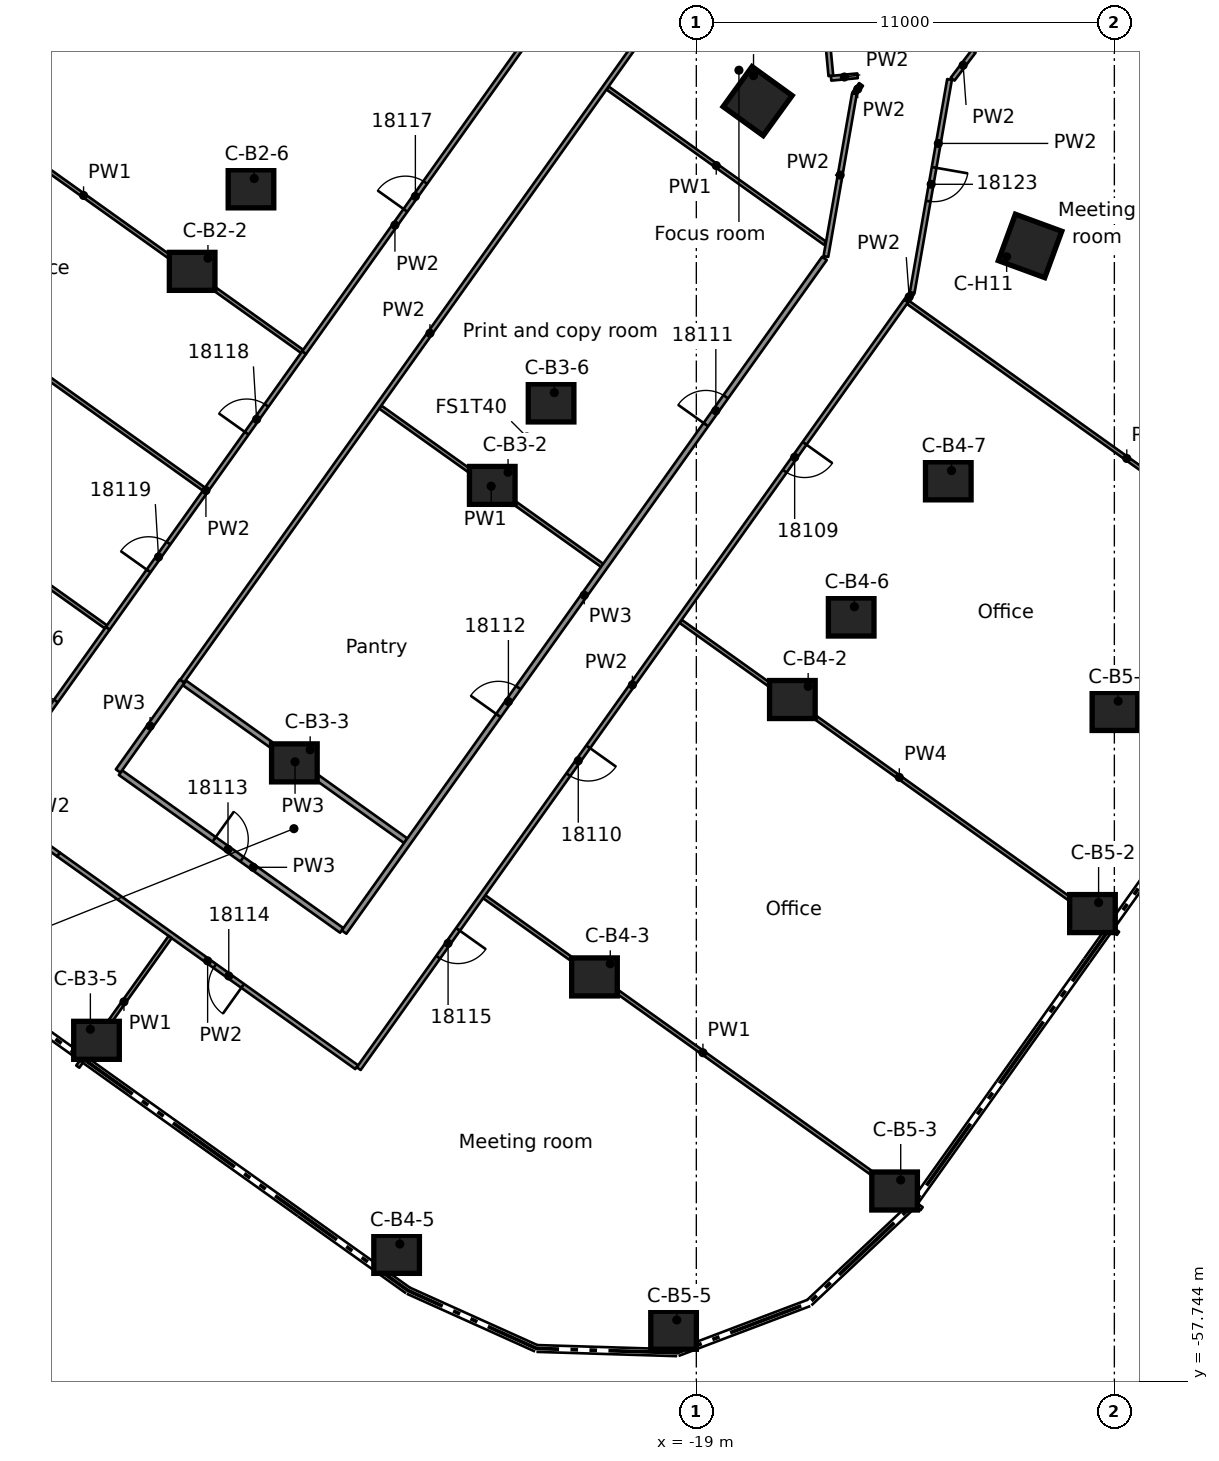
"""IFC4 building model, lengths in metres.
Left out: names, types, materials, properties, quantities, classifications, styles, units other than length and angle.
Written with IfcOpenShell. Run it as: python <this file> out.ifc"""

import sys

from ifc_helpers import new_model, si_unit, direction, frame, frame_2d, origin, origin_2d, place, context, subcontext, project, spatial, rectangle, extrude, element, fill, save


model = new_model("IFC4")
c1 = context("Model", 3, precision=1e-05, world=origin(), true_north=direction((0.0, 1.0)))
c2 = subcontext(c1, "Body", "Model", "MODEL_VIEW")
j1 = project(units=[si_unit("LENGTHUNIT", "METRE"), si_unit("PLANEANGLEUNIT", "RADIAN")], contexts=[c1])
p1 = place(None, origin())
s1 = spatial("IfcSite", under=j1, at=p1, CompositionType="ELEMENT")
p2 = place(p1, origin())
s2 = spatial("IfcBuilding", under=s1, at=p2, CompositionType="ELEMENT")
p3 = place(p2, frame((0.0, 0.0, 91.2)))
s3 = spatial("IfcBuildingStorey", under=s2, at=p3, CompositionType="ELEMENT", Elevation=91.2)
for number, where, z_axis, x_axis in (
    (1, (-32.267, -28.533, 0.0), (0.0, 0.0, 1.0), (1.0, 0.0, 0.0)),
    (2, (-30.719, -26.362, 0.0), (0.0, 0.0, 1.0), (1.0, 0.0, 0.0)),
    (3, (-24.37, -34.166, 0.0), (0.0, 0.0, 1.0), (1.0, 0.0, 0.0)),
    (4, (-29.577, -41.466, 0.0), (0.0, 0.0, 1.0), (1.0, 0.0, 0.0)),
    (5, (-34.784, -48.766, 0.0), (0.0, 0.0, 1.0), (1.0, 0.0, 0.0)),
    (6, (-22.822, -31.995, 0.0), (0.0, 0.0, 1.0), (1.0, 0.0, 0.0)),
    (7, (-16.473, -39.799, 0.0), (0.0, 0.0, 1.0), (1.0, 0.0, 0.0)),
    (8, (-21.68, -47.098, 0.0), (0.0, 0.0, 1.0), (1.0, 0.0, 0.0)),
    (9, (-26.887, -54.398, 0.0), (0.0, 0.0, 1.0), (1.0, 0.0, 0.0)),
    (10, (-14.925, -37.628, 0.0), (0.0, 0.0, 1.0), (1.0, 0.0, 0.0)),
    (11, (-12.37, -34.045, 0.0), (0.0, 0.0, 1.0), (1.0, 0.0, 0.0)),
    (12, (-8.576, -45.431, 0.0), (0.0, 0.0, 1.0), (1.0, 0.0, 0.0)),
    (13, (-13.783, -52.731, 0.0), (0.0, 0.0, 1.0), (1.0, 0.0, 0.0)),
    (14, (-19.599, -56.395, 0.0), (0.0, 0.0, 1.0), (1.0, 0.0, 0.0)),
    (15, (-7.985, -40.113, 0.0), (0.0, 0.0, 1.0), (1.0, 0.0, 0.0)),
):
    element("IfcColumn", number, at=place(p3, frame(where, z_axis=z_axis, x_axis=x_axis)), inside=s3, PredefinedType="COLUMN", context=c2, shape_type="SweptSolid", body=[
        extrude(rectangle(XDim=1.2, YDim=1.0, at=origin_2d()), origin(), (0.0, 0.0, 1.0), 3.5),
    ])
for number, where, z_axis, x_axis in (
    (16, (-10.218, -27.864, 0.0), (0.0, 0.0, 1.0), (-0.344, -0.939, 0.0)),
    (17, (-17.387, -24.053, 0.0), (0.0, 0.0, 1.0), (-0.586, -0.81, 0.0)),
):
    element("IfcColumn", number, at=place(p3, frame(where, z_axis=z_axis, x_axis=x_axis)), inside=s3, PredefinedType="COLUMN", context=c2, shape_type="SweptSolid", body=[
        extrude(rectangle(XDim=1.3, YDim=1.3, at=origin_2d()), origin(), (0.0, 0.0, 1.0), 3.5),
    ])
p4 = place(p3, frame((-16.234, -15.113, 0.0), z_axis=(0.0, 0.0, 1.0), x_axis=(0.093098705764, -0.995656884165, 0.0)))
e18 = element("IfcWall", 18, at=p4, inside=s3, PredefinedType="PARTITIONING", context=c2, shape_type="SweptSolid", body=[
    extrude(rectangle(XDim=8.313, YDim=0.125, at=frame_2d((4.156, 0.0))), origin(), (0.0, 0.0, 1.0), 3.08),
])
p5 = place(p3, frame((-37.685, -42.521, 0.0), z_axis=(0.0, 0.0, 1.0), x_axis=(0.81441767076, -0.580279120385, 0.0)))
e19 = element("IfcWall", 19, at=p5, inside=s3, PredefinedType="PARTITIONING", context=c2, shape_type="SweptSolid", body=[
    extrude(rectangle(XDim=2.337, YDim=0.125, at=frame_2d((1.168, 0.0))), origin(), (0.0, 0.0, 1.0), 3.08),
])
p6 = place(p3, frame((-27.938, -49.473, 0.0), z_axis=(0.0, 0.0, 1.0), x_axis=(-0.814120225936, 0.580696355871, 0.0)))
e20 = element("IfcWall", 20, at=p6, inside=s3, PredefinedType="PARTITIONING", context=c2, shape_type="SweptSolid", body=[
    extrude(rectangle(XDim=9.635, YDim=0.125, at=frame_2d((4.817, 0.0))), origin(), (0.0, 0.0, 1.0), 3.08),
])
p7 = place(p6, frame((3.684, 0.0, 0.0)))
e21 = element("IfcOpeningElement", 21, at=p7, cuts=e20, PredefinedType="OPENING", context=c2, shape_type="SweptSolid", body=[
    extrude(rectangle(XDim=0.9, YDim=2.1, at=frame_2d((0.45, 1.05))), frame((0.0, 0.073, 0.0), z_axis=(0.0, -1.0, 0.0), x_axis=(1.0, 0.0, 0.0)), (0.0, 0.0, 1.0), 0.145),
])
p8 = place(p3, frame((-34.153, -41.723, 0.0), z_axis=(0.0, 0.0, 1.0), x_axis=(0.814226878362, -0.580546803069, 0.0)))
e22 = element("IfcWall", 22, at=p8, inside=s3, PredefinedType="PARTITIONING", context=c2, shape_type="SweptSolid", body=[
    extrude(rectangle(XDim=7.15, YDim=0.15, at=frame_2d((3.575, 0.0))), origin(), (0.0, 0.0, 1.0), 3.08),
])
p9 = place(p8, frame((3.025, 0.0, 0.0)))
e23 = element("IfcOpeningElement", 23, at=p9, cuts=e22, PredefinedType="OPENING", context=c2, shape_type="SweptSolid", body=[
    extrude(rectangle(XDim=0.9, YDim=2.1, at=frame_2d((0.45, 1.05))), frame((0.0, 0.085, 0.0), z_axis=(0.0, -1.0, 0.0), x_axis=(1.0, 0.0, 0.0)), (0.0, 0.0, 1.0), 0.17),
])
p10 = place(p3, frame((-46.044, -29.68, 0.0), z_axis=(0.0, 0.0, 1.0), x_axis=(0.814139435618, -0.580669423486, 0.0)))
e24 = element("IfcWall", 24, at=p10, inside=s3, PredefinedType="PARTITIONING", context=c2, shape_type="SweptSolid", body=[
    extrude(rectangle(XDim=14.134, YDim=0.1, at=frame_2d((7.067, 0.0))), origin(), (0.0, 0.0, 1.0), 3.08),
])
p11 = place(p3, frame((-32.471, -39.361, 0.0), z_axis=(0.0, 0.0, 1.0), x_axis=(0.814159942616, -0.580640670156, 0.0)))
e25 = element("IfcWall", 25, at=p11, inside=s3, PredefinedType="PARTITIONING", context=c2, shape_type="SweptSolid", body=[
    extrude(rectangle(XDim=7.152, YDim=0.15, at=frame_2d((3.576, 0.0))), origin(), (0.0, 0.0, 1.0), 3.08),
])
p12 = place(p3, frame((-24.581, -44.988, 0.0), z_axis=(0.0, 0.0, 1.0), x_axis=(0.814126528241, -0.580687520112, 0.0)))
e26 = element("IfcWall", 26, at=p12, inside=s3, PredefinedType="PARTITIONING", context=c2, shape_type="SweptSolid", body=[
    extrude(rectangle(XDim=14.137, YDim=0.1, at=frame_2d((7.068, 0.0))), origin(), (0.0, 0.0, 1.0), 3.08),
])
p13 = place(p3, frame((-43.46, -26.057, 0.0), z_axis=(0.0, 0.0, 1.0), x_axis=(0.814102199131, -0.580721628124, 0.0)))
e27 = element("IfcWall", 27, at=p13, inside=s3, PredefinedType="PARTITIONING", context=c2, shape_type="SweptSolid", body=[
    extrude(rectangle(XDim=14.131, YDim=0.1, at=frame_2d((7.065, 0.0))), origin(), (0.0, 0.0, 1.0), 3.08),
])
p14 = place(p3, frame((-40.875, -22.433, 0.0), z_axis=(0.0, 0.0, 1.0), x_axis=(0.814073113892, -0.580762399987, 0.0)))
e28 = element("IfcWall", 28, at=p14, inside=s3, PredefinedType="PARTITIONING", context=c2, shape_type="SweptSolid", body=[
    extrude(rectangle(XDim=14.128, YDim=0.1, at=frame_2d((7.064, 0.0))), origin(), (0.0, 0.0, 1.0), 3.08),
])
p15 = place(p3, frame((-27.317, -32.104, 0.0), z_axis=(0.0, 0.0, 1.0), x_axis=(0.814119765042, -0.580697002031, 0.0)))
e29 = element("IfcWall", 29, at=p15, inside=s3, PredefinedType="PARTITIONING", context=c2, shape_type="SweptSolid", body=[
    extrude(rectangle(XDim=7.171, YDim=0.1, at=frame_2d((3.585, 0.0))), origin(), (0.0, 0.0, 1.0), 3.08),
])
p16 = place(p3, frame((-19.413, -37.742, 0.0), z_axis=(0.0, 0.0, 1.0), x_axis=(0.81409387042, -0.580733303801, 0.0)))
e30 = element("IfcWall", 30, at=p16, inside=s3, PredefinedType="PARTITIONING", context=c2, shape_type="SweptSolid", body=[
    extrude(rectangle(XDim=14.137, YDim=0.1, at=frame_2d((7.069, 0.0))), origin(), (0.0, 0.0, 1.0), 2.445),
])
p17 = place(p3, frame((-21.337, -23.709, 0.0), z_axis=(0.0, 0.0, 1.0), x_axis=(0.814073636445, -0.580761667507, 0.0)))
e31 = element("IfcWall", 31, at=p17, inside=s3, PredefinedType="PARTITIONING", context=c2, shape_type="SweptSolid", body=[
    extrude(rectangle(XDim=7.029, YDim=0.1, at=frame_2d((3.514, 0.0))), origin(), (0.0, 0.0, 1.0), 3.08),
])
p18 = place(p3, frame((-13.427, -29.351, 0.0), z_axis=(0.0, 0.0, 1.0), x_axis=(0.814070572037, -0.580765962969, 0.0)))
e32 = element("IfcWall", 32, at=p18, inside=s3, PredefinedType="PARTITIONING", context=c2, shape_type="SweptSolid", body=[
    extrude(rectangle(XDim=14.136, YDim=0.1, at=frame_2d((7.068, 0.0))), origin(), (0.0, 0.0, 1.0), 3.08),
])
p19 = place(p3, frame((-12.256, -23.476, 0.0), z_axis=(0.0, 0.0, 1.0), x_axis=(0.603013454961, 0.797731015528, 0.0)))
e33 = element("IfcWall", 33, at=p19, inside=s3, PredefinedType="PARTITIONING", context=c2, shape_type="SweptSolid", body=[
    extrude(rectangle(XDim=0.919, YDim=0.125, at=frame_2d((0.459, 0.0))), origin(), (0.0, 0.0, 1.0), 3.08),
])
p20 = place(p3, frame((-15.454, -23.452, 0.0), z_axis=(0.0, 0.0, 1.0), x_axis=(0.995687741578, 0.09276810482, 0.0)))
e34 = element("IfcWall", 34, at=p20, inside=s3, PredefinedType="PARTITIONING", context=c2, shape_type="SweptSolid", body=[
    extrude(rectangle(XDim=0.7, YDim=0.125, at=frame_2d((0.35, 0.0))), origin(), (0.0, 0.0, 1.0), 3.08),
])
p21 = place(p3, frame((-14.84, -23.857, 0.0), z_axis=(0.0, 0.0, 1.0), x_axis=(0.586176879317, 0.810183106559, 0.0)))
e35 = element("IfcWall", 35, at=p21, inside=s3, PredefinedType="PARTITIONING", context=c2, shape_type="SweptSolid", body=[
    extrude(rectangle(XDim=0.299, YDim=0.125, at=frame_2d((0.149, 0.0))), origin(), (0.0, 0.0, 1.0), 3.08),
])
p22 = place(p3, frame((-13.478, -29.315, 0.0), z_axis=(0.0, 0.0, 1.0), x_axis=(0.581578261401, 0.813490458374, 0.0)))
e36 = element("IfcWall", 36, at=p22, inside=s3, PredefinedType="PARTITIONING", context=c2, shape_type="SweptSolid", body=[
    extrude(rectangle(XDim=0.271, YDim=0.125, at=frame_2d((0.136, 0.0))), origin(), (0.0, 0.0, 1.0), 3.08),
])
p23 = place(p3, frame((-13.48, -29.312, 0.0), z_axis=(0.0, 0.0, 1.0), x_axis=(-0.580603145907, -0.814186702767, 0.0)))
e37 = element("IfcWall", 37, at=p23, inside=s3, PredefinedType="PARTITIONING", context=c2, shape_type="SweptSolid", body=[
    extrude(rectangle(XDim=24.809, YDim=0.125, at=frame_2d((12.404, 0.0))), origin(), (0.0, 0.0, 1.0), 3.08),
])
p24 = place(p23, frame((4.601, 0.0, 0.0)))
e38 = element("IfcOpeningElement", 38, at=p24, cuts=e37, PredefinedType="OPENING", context=c2, shape_type="SweptSolid", body=[
    extrude(rectangle(XDim=0.9, YDim=2.1, at=frame_2d((0.45, 1.05))), frame((0.0, 0.073, 0.0), z_axis=(0.0, -1.0, 0.0), x_axis=(1.0, 0.0, 0.0)), (0.0, 0.0, 1.0), 0.145),
])
p25 = place(p23, frame((14.408, 0.0, 0.0)))
e39 = element("IfcOpeningElement", 39, at=p25, cuts=e37, PredefinedType="OPENING", context=c2, shape_type="SweptSolid", body=[
    extrude(rectangle(XDim=0.9, YDim=2.1, at=frame_2d((0.45, 1.05))), frame((0.0, 0.073, 0.0), z_axis=(0.0, -1.0, 0.0), x_axis=(1.0, 0.0, 0.0)), (0.0, 0.0, 1.0), 0.145),
])
p26 = place(p23, frame((20.309, 0.0, 0.0)))
e40 = element("IfcOpeningElement", 40, at=p26, cuts=e37, PredefinedType="OPENING", context=c2, shape_type="SweptSolid", body=[
    extrude(rectangle(XDim=0.9, YDim=2.1, at=frame_2d((0.45, 1.05))), frame((0.0, 0.073, 0.0), z_axis=(0.0, -1.0, 0.0), x_axis=(1.0, 0.0, 0.0)), (0.0, 0.0, 1.0), 0.145),
])
p27 = place(p3, frame((-28.27, -45.918, 0.0), z_axis=(0.0, 0.0, 1.0), x_axis=(0.580618548841, 0.81417571859, 0.0)))
e41 = element("IfcWall", 41, at=p27, inside=s3, PredefinedType="PARTITIONING", context=c2, shape_type="SweptSolid", body=[
    extrude(rectangle(XDim=21.772, YDim=0.15, at=frame_2d((10.886, 0.0))), origin(), (0.0, 0.0, 1.0), 3.08),
])
p28 = place(p27, frame((16.399, 0.0, 0.0)))
e42 = element("IfcOpeningElement", 42, at=p28, cuts=e41, PredefinedType="OPENING", context=c2, shape_type="SweptSolid", body=[
    extrude(rectangle(XDim=0.9, YDim=2.1, at=frame_2d((0.45, 1.05))), frame((0.0, 0.085, 0.0), z_axis=(0.0, -1.0, 0.0), x_axis=(1.0, 0.0, 0.0)), (0.0, 0.0, 1.0), 0.17),
])
p29 = place(p27, frame((6.999, 0.0, 0.0)))
e43 = element("IfcOpeningElement", 43, at=p29, cuts=e41, PredefinedType="OPENING", context=c2, shape_type="SweptSolid", body=[
    extrude(rectangle(XDim=0.9, YDim=2.1, at=frame_2d((0.45, 1.05))), frame((0.0, 0.085, 0.0), z_axis=(0.0, -1.0, 0.0), x_axis=(1.0, 0.0, 0.0)), (0.0, 0.0, 1.0), 0.17),
])
p30 = place(p3, frame((-35.277, -49.458, 0.0), z_axis=(0.0, 0.0, 1.0), x_axis=(0.580636826357, 0.814162683914, 0.0)))
e44 = element("IfcWall", 44, at=p30, inside=s3, PredefinedType="PARTITIONING", context=c2, shape_type="SweptSolid", body=[
    extrude(rectangle(XDim=4.187, YDim=0.1, at=frame_2d((2.094, 0.0))), origin(), (0.0, 0.0, 1.0), 3.08),
])
p31 = place(p3, frame((-32.532, -39.317, 0.0), z_axis=(0.0, 0.0, 1.0), x_axis=(0.58017556932, 0.814491441799, 0.0)))
e45 = element("IfcWall", 45, at=p31, inside=s3, PredefinedType="PARTITIONING", context=c2, shape_type="SweptSolid", body=[
    extrude(rectangle(XDim=22.483, YDim=0.125, at=frame_2d((11.241, 0.0))), origin(), (0.0, 0.0, 1.0), 3.08),
])
p32 = place(p3, frame((-34.214, -41.679, 0.0), z_axis=(0.0, 0.0, 1.0), x_axis=(0.580082812888, 0.814557505761, 0.0)))
e46 = element("IfcWall", 46, at=p32, inside=s3, PredefinedType="PARTITIONING", context=c2, shape_type="SweptSolid", body=[
    extrude(rectangle(XDim=2.9, YDim=0.15, at=frame_2d((1.45, 0.0))), origin(), (0.0, 0.0, 1.0), 3.08),
])
p33 = place(p3, frame((-37.736, -42.485, 0.0), z_axis=(0.0, 0.0, 1.0), x_axis=(0.580223472601, 0.814457317385, 0.0)))
e47 = element("IfcWall", 47, at=p33, inside=s3, PredefinedType="PARTITIONING", context=c2, shape_type="SweptSolid", body=[
    extrude(rectangle(XDim=5.601, YDim=0.125, at=frame_2d((2.801, 0.0))), origin(), (0.0, 0.0, 1.0), 3.08),
])
p34 = place(p33, frame((2.35, 0.0, 0.0)))
e48 = element("IfcOpeningElement", 48, at=p34, cuts=e47, PredefinedType="OPENING", context=c2, shape_type="SweptSolid", body=[
    extrude(rectangle(XDim=0.9, YDim=2.1, at=frame_2d((0.45, 1.05))), frame((0.0, 0.073, 0.0), z_axis=(0.0, -1.0, 0.0), x_axis=(1.0, 0.0, 0.0)), (0.0, 0.0, 1.0), 0.145),
])
p35 = place(p3, frame((-29.323, -30.674, 0.0), z_axis=(0.0, 0.0, 1.0), x_axis=(0.580180127153, 0.814488195161, 0.0)))
e49 = element("IfcWall", 49, at=p35, inside=s3, PredefinedType="PARTITIONING", context=c2, shape_type="SweptSolid", body=[
    extrude(rectangle(XDim=10.307, YDim=0.125, at=frame_2d((5.154, 0.0))), origin(), (0.0, 0.0, 1.0), 3.08),
])
p36 = place(p35, frame((4.6, 0.0, 0.0)))
e50 = element("IfcOpeningElement", 50, at=p36, cuts=e49, PredefinedType="OPENING", context=c2, shape_type="SweptSolid", body=[
    extrude(rectangle(XDim=0.9, YDim=2.1, at=frame_2d((0.45, 1.05))), frame((0.0, 0.073, 0.0), z_axis=(0.0, -1.0, 0.0), x_axis=(1.0, 0.0, 0.0)), (0.0, 0.0, 1.0), 0.145),
])
p37 = place(p3, frame((-34.486, -37.923, 0.0), z_axis=(0.0, 0.0, 1.0), x_axis=(0.580137406413, 0.814518624514, 0.0)))
e51 = element("IfcWall", 51, at=p37, inside=s3, PredefinedType="PARTITIONING", context=c2, shape_type="SweptSolid", body=[
    extrude(rectangle(XDim=8.9, YDim=0.125, at=frame_2d((4.45, 0.0))), origin(), (0.0, 0.0, 1.0), 3.08),
])
p38 = place(p37, frame((6.299, 0.0, 0.0)))
e52 = element("IfcOpeningElement", 52, at=p38, cuts=e51, PredefinedType="OPENING", context=c2, shape_type="SweptSolid", body=[
    extrude(rectangle(XDim=0.9, YDim=2.1, at=frame_2d((0.45, 1.05))), frame((0.0, 0.073, 0.0), z_axis=(0.0, -1.0, 0.0), x_axis=(1.0, 0.0, 0.0)), (0.0, 0.0, 1.0), 0.145),
])
p39 = place(p37, frame((1.85, 0.0, 0.0)))
e53 = element("IfcOpeningElement", 53, at=p39, cuts=e51, PredefinedType="OPENING", context=c2, shape_type="SweptSolid", body=[
    extrude(rectangle(XDim=0.9, YDim=2.1, at=frame_2d((0.45, 1.05))), frame((0.0, 0.073, 0.0), z_axis=(0.0, -1.0, 0.0), x_axis=(1.0, 0.0, 0.0)), (0.0, 0.0, 1.0), 0.145),
])
p40 = place(p3, frame((-12.337, -23.484, 0.0), z_axis=(0.0, 0.0, 1.0), x_axis=(-0.172645513087, -0.984984023632, 0.0)))
e54 = element("IfcWall", 54, at=p40, inside=s3, PredefinedType="PARTITIONING", context=c2, shape_type="SweptSolid", body=[
    extrude(rectangle(XDim=5.695, YDim=0.125, at=frame_2d((2.847, 0.0))), origin(), (0.0, 0.0, 1.0), 3.08),
])
p41 = place(p40, frame((2.35, 0.0, 0.0)))
e55 = element("IfcOpeningElement", 55, at=p41, cuts=e54, PredefinedType="OPENING", context=c2, shape_type="SweptSolid", body=[
    extrude(rectangle(XDim=0.9, YDim=2.1, at=frame_2d((0.45, 1.05))), frame((0.0, 0.073, 0.0), z_axis=(0.0, -1.0, 0.0), x_axis=(1.0, 0.0, 0.0)), (0.0, 0.0, 1.0), 0.145),
])
p42 = place(p3, frame((-14.84, -23.857, 0.0), z_axis=(0.0, 0.0, 1.0), x_axis=(-0.172581751395, -0.984995197494, 0.0)))
e56 = element("IfcWall", 56, at=p42, inside=s3, PredefinedType="PARTITIONING", context=c2, shape_type="SweptSolid", body=[
    extrude(rectangle(XDim=4.351, YDim=0.125, at=frame_2d((2.176, 0.0))), origin(), (0.0, 0.0, 1.0), 3.08),
])
p43 = place(p24, origin())
e57 = element("IfcDoor", 57, at=p43, inside=s3, OperationType="SINGLE_SWING_LEFT", PredefinedType="DOOR", context=c2, shape_type="SweptSolid", body=[
    extrude(rectangle(XDim=0.9, YDim=2.1, at=frame_2d((0.45, 1.05))), frame((0.0, 0.025, 0.0), z_axis=(0.0, -1.0, 0.0), x_axis=(1.0, 0.0, 0.0)), (0.0, 0.0, 1.0), 0.05),
])
fill(e38, e57)
p44 = place(p25, origin())
e58 = element("IfcDoor", 58, at=p44, inside=s3, OperationType="SINGLE_SWING_RIGHT", PredefinedType="DOOR", context=c2, shape_type="SweptSolid", body=[
    extrude(rectangle(XDim=0.9, YDim=2.1, at=frame_2d((0.45, 1.05))), frame((0.0, 0.025, 0.0), z_axis=(0.0, -1.0, 0.0), x_axis=(1.0, 0.0, 0.0)), (0.0, 0.0, 1.0), 0.05),
])
fill(e39, e58)
p45 = place(p28, origin())
e59 = element("IfcDoor", 59, at=p45, inside=s3, OperationType="SINGLE_SWING_RIGHT", PredefinedType="DOOR", context=c2, shape_type="SweptSolid", body=[
    extrude(rectangle(XDim=0.9, YDim=2.1, at=frame_2d((0.45, 1.05))), frame((0.0, 0.025, 0.0), z_axis=(0.0, -1.0, 0.0), x_axis=(1.0, 0.0, 0.0)), (0.0, 0.0, 1.0), 0.05),
])
fill(e42, e59)
p46 = place(p29, origin())
e60 = element("IfcDoor", 60, at=p46, inside=s3, OperationType="SINGLE_SWING_LEFT", PredefinedType="DOOR", context=c2, shape_type="SweptSolid", body=[
    extrude(rectangle(XDim=0.9, YDim=2.1, at=frame_2d((0.45, 1.05))), frame((0.0, 0.025, 0.0), z_axis=(0.0, -1.0, 0.0), x_axis=(1.0, 0.0, 0.0)), (0.0, 0.0, 1.0), 0.05),
])
fill(e43, e60)
p47 = place(p9, origin())
e61 = element("IfcDoor", 61, at=p47, inside=s3, OperationType="SINGLE_SWING_LEFT", PredefinedType="DOOR", context=c2, shape_type="SweptSolid", body=[
    extrude(rectangle(XDim=0.9, YDim=2.1, at=frame_2d((0.45, 1.05))), frame((0.0, 0.025, 0.0), z_axis=(0.0, -1.0, 0.0), x_axis=(1.0, 0.0, 0.0)), (0.0, 0.0, 1.0), 0.05),
])
fill(e23, e61)
p48 = place(p7, origin())
e62 = element("IfcDoor", 62, at=p48, inside=s3, OperationType="SINGLE_SWING_LEFT", PredefinedType="DOOR", context=c2, shape_type="SweptSolid", body=[
    extrude(rectangle(XDim=0.9, YDim=2.1, at=frame_2d((0.45, 1.05))), frame((0.0, 0.025, 0.0), z_axis=(0.0, -1.0, 0.0), x_axis=(1.0, 0.0, 0.0)), (0.0, 0.0, 1.0), 0.05),
])
fill(e21, e62)
p49 = place(p26, origin())
e63 = element("IfcDoor", 63, at=p49, inside=s3, OperationType="SINGLE_SWING_RIGHT", PredefinedType="DOOR", context=c2, shape_type="SweptSolid", body=[
    extrude(rectangle(XDim=0.9, YDim=2.1, at=frame_2d((0.45, 1.05))), frame((0.0, 0.025, 0.0), z_axis=(0.0, -1.0, 0.0), x_axis=(1.0, 0.0, 0.0)), (0.0, 0.0, 1.0), 0.05),
])
fill(e40, e63)
p50 = place(p34, origin())
e64 = element("IfcDoor", 64, at=p50, inside=s3, OperationType="SINGLE_SWING_LEFT", PredefinedType="DOOR", context=c2, shape_type="SweptSolid", body=[
    extrude(rectangle(XDim=0.9, YDim=2.1, at=frame_2d((0.45, 1.05))), frame((0.0, 0.025, 0.0), z_axis=(0.0, -1.0, 0.0), x_axis=(1.0, 0.0, 0.0)), (0.0, 0.0, 1.0), 0.05),
])
fill(e48, e64)
p51 = place(p36, origin())
e65 = element("IfcDoor", 65, at=p51, inside=s3, OperationType="SINGLE_SWING_LEFT", PredefinedType="DOOR", context=c2, shape_type="SweptSolid", body=[
    extrude(rectangle(XDim=0.9, YDim=2.1, at=frame_2d((0.45, 1.05))), frame((0.0, 0.025, 0.0), z_axis=(0.0, -1.0, 0.0), x_axis=(1.0, 0.0, 0.0)), (0.0, 0.0, 1.0), 0.05),
])
fill(e50, e65)
p52 = place(p38, origin())
e66 = element("IfcDoor", 66, at=p52, inside=s3, OperationType="SINGLE_SWING_RIGHT", PredefinedType="DOOR", context=c2, shape_type="SweptSolid", body=[
    extrude(rectangle(XDim=0.9, YDim=2.1, at=frame_2d((0.45, 1.05))), frame((0.0, 0.025, 0.0), z_axis=(0.0, -1.0, 0.0), x_axis=(1.0, 0.0, 0.0)), (0.0, 0.0, 1.0), 0.05),
])
fill(e52, e66)
p53 = place(p39, origin())
e67 = element("IfcDoor", 67, at=p53, inside=s3, OperationType="SINGLE_SWING_LEFT", PredefinedType="DOOR", context=c2, shape_type="SweptSolid", body=[
    extrude(rectangle(XDim=0.9, YDim=2.1, at=frame_2d((0.45, 1.05))), frame((0.0, 0.025, 0.0), z_axis=(0.0, -1.0, 0.0), x_axis=(1.0, 0.0, 0.0)), (0.0, 0.0, 1.0), 0.05),
])
fill(e53, e67)
p54 = place(p41, origin())
e68 = element("IfcDoor", 68, at=p54, inside=s3, OperationType="SINGLE_SWING_LEFT", PredefinedType="DOOR", context=c2, shape_type="SweptSolid", body=[
    extrude(rectangle(XDim=0.9, YDim=2.1, at=frame_2d((0.45, 1.05))), frame((0.0, 0.025, 0.0), z_axis=(0.0, -1.0, 0.0), x_axis=(1.0, 0.0, 0.0)), (0.0, 0.0, 1.0), 0.05),
])
fill(e55, e68)
save(model, sys.argv[1])
